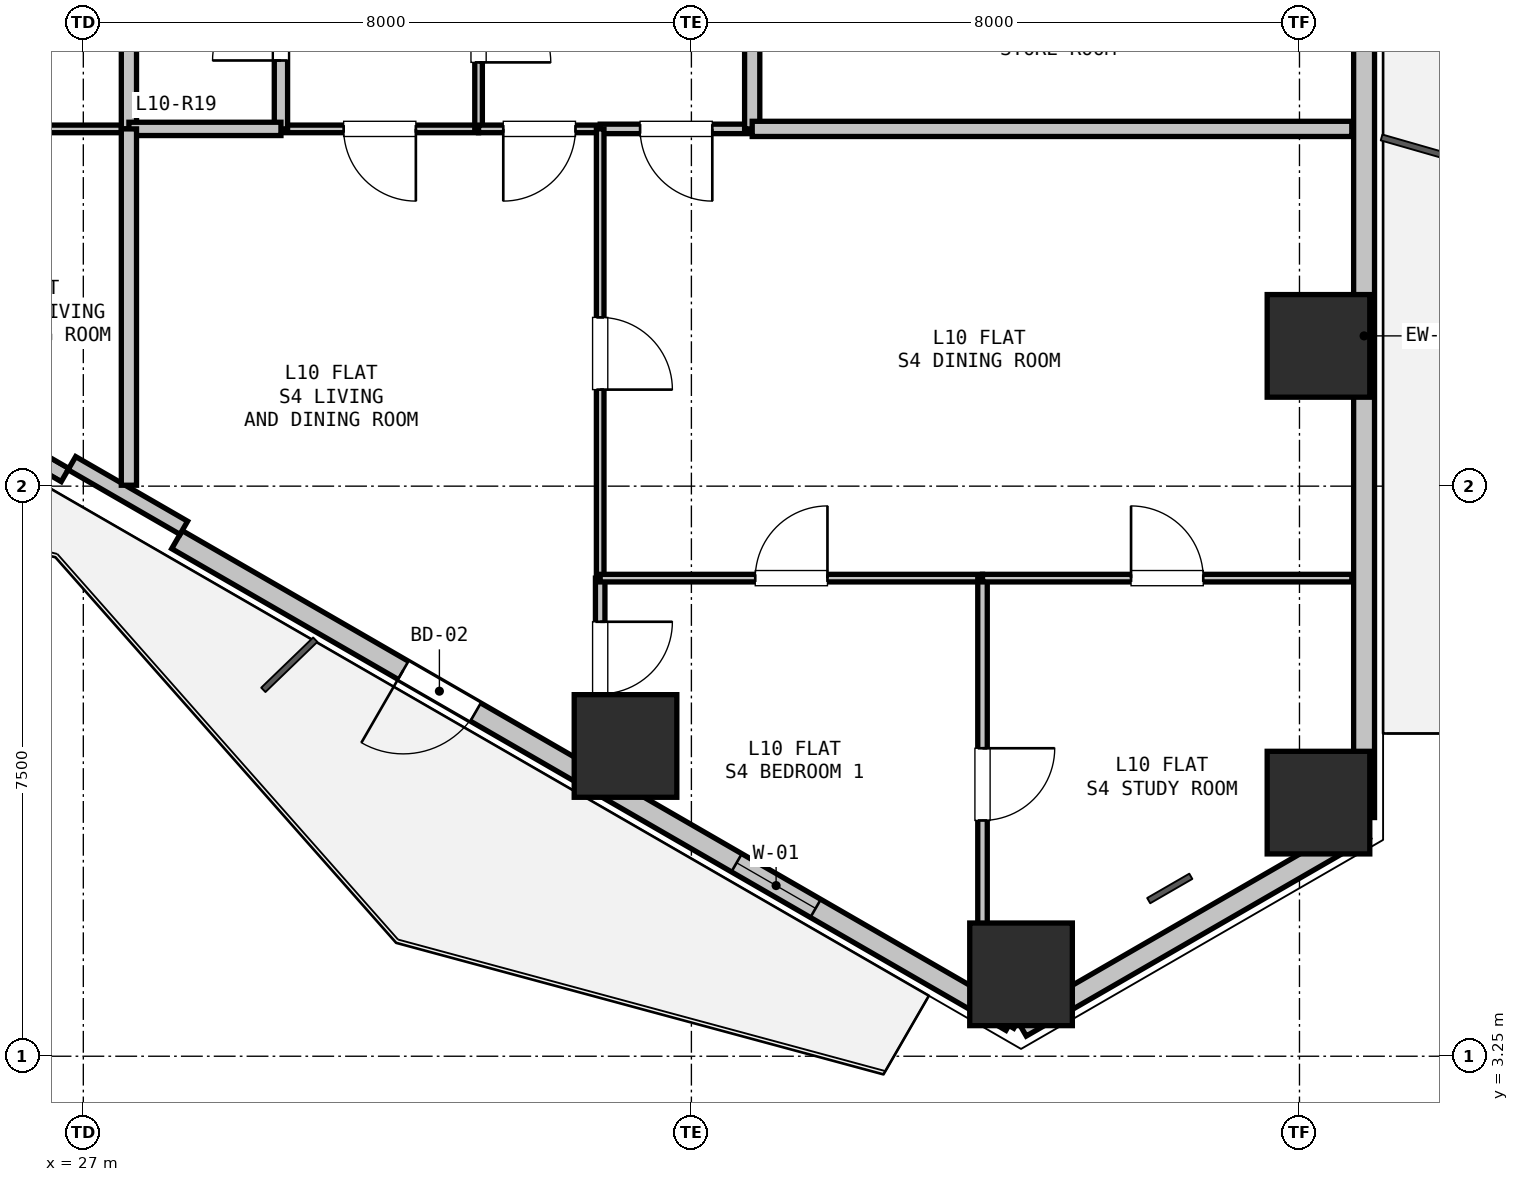
"""IFC4 building model, lengths in metres.
Left out: names, types, materials, properties, quantities, classifications, styles, units other than length and angle.
Written with IfcOpenShell. Run it as: python <this file> out.ifc"""

import sys

from ifc_helpers import new_model, si_unit, direction, frame, frame_2d, origin, origin_2d, place, context, subcontext, project, spatial, rectangle, hollow_rectangle, extrude, element, fill, save


model = new_model("IFC4")
c1 = context("Model", 3, precision=1e-05, world=origin(), true_north=direction((0.0, 1.0)))
c2 = subcontext(c1, "Body", "Model", "MODEL_VIEW")
j1 = project(units=[si_unit("LENGTHUNIT", "METRE"), si_unit("PLANEANGLEUNIT", "RADIAN")], contexts=[c1])
p1 = place(None, origin())
s1 = spatial("IfcSite", under=j1, at=p1, CompositionType="ELEMENT")
p2 = place(p1, origin())
s2 = spatial("IfcBuilding", under=s1, at=p2, CompositionType="ELEMENT")
p3 = place(p2, frame((0.0, 0.0, 39.0)))
s3 = spatial("IfcBuildingStorey", under=s2, at=p3, CompositionType="ELEMENT", Elevation=39.0)
for number, where, z_axis, x_axis in (
    (1, (43.25, 12.595, 0.0), (0.0, 0.0, 1.0), (1.0, 0.0, 0.0)),
    (2, (43.25, 6.587, 0.0), (0.0, 0.0, 1.0), (1.0, 0.0, 0.0)),
    (3, (39.337, 4.327, 0.0), (0.0, 0.0, 1.0), (1.0, 0.0, 0.0)),
    (4, (34.133, 7.332, 0.0), (0.0, 0.0, 1.0), (1.0, 0.0, 0.0)),
):
    element("IfcColumn", number, at=place(p3, frame(where, z_axis=z_axis, x_axis=x_axis)), inside=s3, PredefinedType="COLUMN", context=c2, shape_type="SweptSolid", body=[
        extrude(hollow_rectangle(XDim=1.35, YDim=1.35, WallThickness=0.036, at=origin_2d()), origin(), (0.0, 0.0, 1.0), 3.3),
    ])
p4 = place(p3, frame((43.85, 6.24, 0.0), z_axis=(0.0, 0.0, 1.0), x_axis=(-0.866043601342, -0.499968479581, 0.0)))
e5 = element("IfcWall", 5, at=p4, inside=s3, PredefinedType="SOLIDWALL", context=c2, shape_type="SweptSolid", body=[
    extrude(rectangle(XDim=5.211, YDim=0.275, at=frame_2d((2.605, 0.0))), origin(), (0.0, 0.0, 1.0), 2.66),
])
p5 = place(p3, frame((43.85, 19.063, 0.0), z_axis=(0.0, 0.0, 1.0), x_axis=(0.0, -1.0, 0.0)))
e6 = element("IfcWall", 6, at=p5, inside=s3, PredefinedType="SOLIDWALL", context=c2, shape_type="SweptSolid", body=[
    extrude(rectangle(XDim=12.673, YDim=0.275, at=frame_2d((6.336, 0.0))), origin(), (0.0, 0.0, 1.0), 2.66),
])
p6 = place(p3, frame((39.207, 3.71, 0.0), z_axis=(0.0, 0.0, 1.0), x_axis=(-0.86603192154, 0.499988710747, 0.0)))
e7 = element("IfcWall", 7, at=p6, inside=s3, PredefinedType="SOLIDWALL", context=c2, shape_type="SweptSolid", body=[
    extrude(rectangle(XDim=12.673, YDim=0.275, at=frame_2d((6.336, 0.0))), origin(), (0.0, 0.0, 1.0), 2.66),
])
p7 = place(p6, frame((8.136, 0.0, 0.0)))
e8 = element("IfcOpeningElement", 8, at=p7, cuts=e7, PredefinedType="OPENING", context=c2, shape_type="SweptSolid", body=[
    extrude(rectangle(XDim=1.1, YDim=2.1, at=frame_2d((0.55, 1.05))), frame((0.0, 0.147, 0.0), z_axis=(0.0, -1.0, 0.0), x_axis=(1.0, 0.0, 0.0)), (0.0, 0.0, 1.0), 0.295),
])
p8 = place(p6, frame((2.971, 0.0, 0.9)))
e9 = element("IfcOpeningElement", 9, at=p8, cuts=e7, PredefinedType="OPENING", context=c2, shape_type="SweptSolid", body=[
    extrude(rectangle(XDim=1.2, YDim=1.4, at=frame_2d((0.6, 0.7))), frame((0.0, 0.147, 0.0), z_axis=(0.0, -1.0, 0.0), x_axis=(1.0, 0.0, 0.0)), (0.0, 0.0, 1.0), 0.295),
])
p9 = place(p3, frame((26.76, 10.896, 0.0), z_axis=(0.0, 0.0, 1.0), x_axis=(-0.866027351828, 0.499996625875, 0.0)))
e10 = element("IfcWall", 10, at=p9, inside=s3, PredefinedType="PARAPET", context=c2, shape_type="SweptSolid", body=[
    extrude(rectangle(XDim=11.973, YDim=0.2, at=frame_2d((5.987, 0.0))), origin(), (0.0, 0.0, 1.0), 0.2),
])
p10 = place(p3, frame((28.322, 10.202, 0.0), z_axis=(0.0, 0.0, 1.0), x_axis=(-0.86605165483, 0.499954529098, 0.0)))
e11 = element("IfcWall", 11, at=p10, inside=s3, PredefinedType="PARAPET", context=c2, shape_type="SweptSolid", body=[
    extrude(rectangle(XDim=1.7, YDim=0.2, at=frame_2d((0.85, 0.0))), origin(), (0.0, 0.0, 1.0), 2.66),
])
p11 = place(p3, frame((32.2, 15.45, 0.0), z_axis=(0.0, 0.0, 1.0), x_axis=(-1.0, 0.0, 0.0)))
e12 = element("IfcWall", 12, at=p11, inside=s3, PredefinedType="PARTITIONING", context=c2, shape_type="SweptSolid", body=[
    extrude(rectangle(XDim=2.6, YDim=0.1, at=frame_2d((1.3, 0.0))), origin(), (0.0, 0.0, 1.0), 3.04),
])
p12 = place(p11, frame((0.825, 0.0, 0.0)))
e13 = element("IfcOpeningElement", 13, at=p12, cuts=e12, PredefinedType="OPENING", context=c2, shape_type="SweptSolid", body=[
    extrude(rectangle(XDim=0.95, YDim=2.1, at=frame_2d((0.475, 1.05))), frame((0.0, 0.06, 0.0), z_axis=(0.0, -1.0, 0.0), x_axis=(1.0, 0.0, 0.0)), (0.0, 0.0, 1.0), 0.12),
])
p13 = place(p3, frame((29.6, 15.45, 0.0), z_axis=(0.0, 0.0, 1.0), x_axis=(0.0, 1.0, 0.0)))
e14 = element("IfcWall", 14, at=p13, inside=s3, PredefinedType="PLUMBINGWALL", context=c2, shape_type="SweptSolid", body=[
    extrude(rectangle(XDim=2.7, YDim=0.175, at=frame_2d((1.35, 0.0))), origin(), (0.0, 0.0, 1.0), 3.04),
])
p14 = place(p13, frame((0.9, 0.0, 0.0)))
e15 = element("IfcOpeningElement", 15, at=p14, cuts=e14, PredefinedType="OPENING", context=c2, shape_type="SweptSolid", body=[
    extrude(rectangle(XDim=0.9, YDim=2.1, at=frame_2d((0.45, 1.05))), frame((0.0, 0.097, 0.0), z_axis=(0.0, -1.0, 0.0), x_axis=(1.0, 0.0, 0.0)), (0.0, 0.0, 1.0), 0.195),
])
p15 = place(p3, frame((32.2, 18.15, 0.0), z_axis=(0.0, 0.0, 1.0), x_axis=(0.0, -1.0, 0.0)))
e16 = element("IfcWall", 16, at=p15, inside=s3, PredefinedType="PARTITIONING", context=c2, shape_type="SweptSolid", body=[
    extrude(rectangle(XDim=2.7, YDim=0.1, at=frame_2d((1.35, 0.0))), origin(), (0.0, 0.0, 1.0), 3.04),
])
p16 = place(p15, frame((0.875, 0.0, 0.0)))
e17 = element("IfcOpeningElement", 17, at=p16, cuts=e16, PredefinedType="OPENING", context=c2, shape_type="SweptSolid", body=[
    extrude(rectangle(XDim=0.95, YDim=2.1, at=frame_2d((0.475, 1.05))), frame((0.0, 0.06, 0.0), z_axis=(0.0, -1.0, 0.0), x_axis=(1.0, 0.0, 0.0)), (0.0, 0.0, 1.0), 0.12),
])
p17 = place(p3, frame((27.6, 15.45, 0.0), z_axis=(0.0, 0.0, 1.0), x_axis=(-1.0, 0.0, 0.0)))
e18 = element("IfcWall", 18, at=p17, inside=s3, PredefinedType="PARTITIONING", context=c2, shape_type="SweptSolid", body=[
    extrude(rectangle(XDim=3.2, YDim=0.1, at=frame_2d((1.6, 0.0))), origin(), (0.0, 0.0, 1.0), 2.337),
])
p18 = place(p17, frame((1.125, 0.0, 0.0)))
e19 = element("IfcOpeningElement", 19, at=p18, cuts=e18, PredefinedType="OPENING", context=c2, shape_type="SweptSolid", body=[
    extrude(rectangle(XDim=0.95, YDim=2.1, at=frame_2d((0.475, 1.05))), frame((0.0, 0.06, 0.0), z_axis=(0.0, -1.0, 0.0), x_axis=(1.0, 0.0, 0.0)), (0.0, 0.0, 1.0), 0.12),
])
p19 = place(p3, frame((27.6, 18.15, 0.0), z_axis=(0.0, 0.0, 1.0), x_axis=(0.0, -1.0, 0.0)))
e20 = element("IfcWall", 20, at=p19, inside=s3, PredefinedType="PARTITIONING", context=c2, shape_type="SweptSolid", body=[
    extrude(rectangle(XDim=2.7, YDim=0.2, at=frame_2d((1.35, 0.0))), origin(), (0.0, 0.0, 1.0), 3.04),
])
p20 = place(p3, frame((29.6, 15.45, 0.0), z_axis=(0.0, 0.0, 1.0), x_axis=(-1.0, 0.0, 0.0)))
e21 = element("IfcWall", 21, at=p20, inside=s3, PredefinedType="PLUMBINGWALL", context=c2, shape_type="SweptSolid", body=[
    extrude(rectangle(XDim=2.0, YDim=0.175, at=frame_2d((1.0, 0.0))), origin(), (0.0, 0.0, 1.0), 3.04),
])
p21 = place(p3, frame((35.8, 15.45, 0.0), z_axis=(0.0, 0.0, 1.0), x_axis=(-1.0, 0.0, 0.0)))
e22 = element("IfcWall", 22, at=p21, inside=s3, PredefinedType="PARTITIONING", context=c2, shape_type="SweptSolid", body=[
    extrude(rectangle(XDim=2.0, YDim=0.125, at=frame_2d((1.0, 0.0))), origin(), (0.0, 0.0, 1.0), 3.04),
])
p22 = place(p21, frame((0.525, 0.0, 0.0)))
e23 = element("IfcOpeningElement", 23, at=p22, cuts=e22, PredefinedType="OPENING", context=c2, shape_type="SweptSolid", body=[
    extrude(rectangle(XDim=0.95, YDim=2.1, at=frame_2d((0.475, 1.05))), frame((0.0, 0.073, 0.0), z_axis=(0.0, -1.0, 0.0), x_axis=(1.0, 0.0, 0.0)), (0.0, 0.0, 1.0), 0.145),
])
p23 = place(p3, frame((33.8, 15.45, 0.0), z_axis=(0.0, 0.0, 1.0), x_axis=(-1.0, 0.0, 0.0)))
e24 = element("IfcWall", 24, at=p23, inside=s3, PredefinedType="PARTITIONING", context=c2, shape_type="SweptSolid", body=[
    extrude(rectangle(XDim=1.6, YDim=0.1, at=frame_2d((0.8, 0.0))), origin(), (0.0, 0.0, 1.0), 3.04),
])
p24 = place(p23, frame((0.325, 0.0, 0.0)))
e25 = element("IfcOpeningElement", 25, at=p24, cuts=e24, PredefinedType="OPENING", context=c2, shape_type="SweptSolid", body=[
    extrude(rectangle(XDim=0.95, YDim=2.1, at=frame_2d((0.475, 1.05))), frame((0.0, 0.06, 0.0), z_axis=(0.0, -1.0, 0.0), x_axis=(1.0, 0.0, 0.0)), (0.0, 0.0, 1.0), 0.12),
])
p25 = place(p3, frame((35.8, 18.15, 0.0), z_axis=(0.0, 0.0, 1.0), x_axis=(0.0, -1.0, 0.0)))
e26 = element("IfcWall", 26, at=p25, inside=s3, PredefinedType="PARTITIONING", context=c2, shape_type="SweptSolid", body=[
    extrude(rectangle(XDim=2.7, YDim=0.2, at=frame_2d((1.35, 0.0))), origin(), (0.0, 0.0, 1.0), 3.04),
])
p26 = place(p3, frame((43.688, 15.45, 0.0), z_axis=(0.0, 0.0, 1.0), x_axis=(-1.0, 0.0, 0.0)))
e27 = element("IfcWall", 27, at=p26, inside=s3, PredefinedType="PARTITIONING", context=c2, shape_type="SweptSolid", body=[
    extrude(rectangle(XDim=7.888, YDim=0.2, at=frame_2d((3.944, 0.0))), origin(), (0.0, 0.0, 1.0), 2.337),
])
p27 = place(p3, frame((27.6, 15.45, 0.0), z_axis=(0.0, 0.0, 1.0), x_axis=(0.0, -1.0, 0.0)))
e28 = element("IfcWall", 28, at=p27, inside=s3, PredefinedType="PARTITIONING", context=c2, shape_type="SweptSolid", body=[
    extrude(rectangle(XDim=4.688, YDim=0.2, at=frame_2d((2.344, 0.0))), origin(), (0.0, 0.0, 1.0), 2.337),
])
p28 = place(p3, frame((33.8, 15.45, 0.0), z_axis=(0.0, 0.0, 1.0), x_axis=(0.0, -1.0, 0.0)))
e29 = element("IfcWall", 29, at=p28, inside=s3, PredefinedType="PARTITIONING", context=c2, shape_type="SweptSolid", body=[
    extrude(rectangle(XDim=5.91, YDim=0.1, at=frame_2d((2.955, 0.0))), origin(), (0.0, 0.0, 1.0), 3.04),
])
p29 = place(p28, frame((2.48, 0.0, 0.0)))
e30 = element("IfcOpeningElement", 30, at=p29, cuts=e29, PredefinedType="OPENING", context=c2, shape_type="SweptSolid", body=[
    extrude(rectangle(XDim=0.95, YDim=2.1, at=frame_2d((0.475, 1.05))), frame((0.0, 0.06, 0.0), z_axis=(0.0, -1.0, 0.0), x_axis=(1.0, 0.0, 0.0)), (0.0, 0.0, 1.0), 0.12),
])
p30 = place(p3, frame((33.8, 9.54, 0.0), z_axis=(0.0, 0.0, 1.0), x_axis=(0.0, -1.0, 0.0)))
e31 = element("IfcWall", 31, at=p30, inside=s3, PredefinedType="PARTITIONING", context=c2, shape_type="SweptSolid", body=[
    extrude(rectangle(XDim=2.522, YDim=0.125, at=frame_2d((1.261, 0.0))), origin(), (0.0, 0.0, 1.0), 2.337),
])
p31 = place(p30, frame((0.574, 0.0, 0.0)))
e32 = element("IfcOpeningElement", 32, at=p31, cuts=e31, PredefinedType="OPENING", context=c2, shape_type="SweptSolid", body=[
    extrude(rectangle(XDim=0.95, YDim=2.1, at=frame_2d((0.475, 1.05))), frame((0.0, 0.073, 0.0), z_axis=(0.0, -1.0, 0.0), x_axis=(1.0, 0.0, 0.0)), (0.0, 0.0, 1.0), 0.145),
])
p32 = place(p3, frame((33.8, 9.54, 0.0), z_axis=(0.0, 0.0, 1.0), x_axis=(1.0, 0.0, 0.0)))
e33 = element("IfcWall", 33, at=p32, inside=s3, PredefinedType="PARTITIONING", context=c2, shape_type="SweptSolid", body=[
    extrude(rectangle(XDim=5.03, YDim=0.1, at=frame_2d((2.515, 0.0))), origin(), (0.0, 0.0, 1.0), 3.04),
])
p33 = place(p32, frame((2.04, 0.0, 0.0)))
e34 = element("IfcOpeningElement", 34, at=p33, cuts=e33, PredefinedType="OPENING", context=c2, shape_type="SweptSolid", body=[
    extrude(rectangle(XDim=0.95, YDim=2.1, at=frame_2d((0.475, 1.05))), frame((0.0, 0.06, 0.0), z_axis=(0.0, -1.0, 0.0), x_axis=(1.0, 0.0, 0.0)), (0.0, 0.0, 1.0), 0.12),
])
p34 = place(p3, frame((38.83, 9.54, 0.0), z_axis=(0.0, 0.0, 1.0), x_axis=(0.0, -1.0, 0.0)))
e35 = element("IfcWall", 35, at=p34, inside=s3, PredefinedType="PARTITIONING", context=c2, shape_type="SweptSolid", body=[
    extrude(rectangle(XDim=5.426, YDim=0.125, at=frame_2d((2.713, 0.0))), origin(), (0.0, 0.0, 1.0), 2.65),
])
p35 = place(p34, frame((2.238, 0.0, 0.0)))
e36 = element("IfcOpeningElement", 36, at=p35, cuts=e35, PredefinedType="OPENING", context=c2, shape_type="SweptSolid", body=[
    extrude(rectangle(XDim=0.95, YDim=2.1, at=frame_2d((0.475, 1.05))), frame((0.0, 0.073, 0.0), z_axis=(0.0, -1.0, 0.0), x_axis=(1.0, 0.0, 0.0)), (0.0, 0.0, 1.0), 0.145),
])
p36 = place(p3, frame((38.83, 9.54, 0.0), z_axis=(0.0, 0.0, 1.0), x_axis=(1.0, 0.0, 0.0)))
e37 = element("IfcWall", 37, at=p36, inside=s3, PredefinedType="PARTITIONING", context=c2, shape_type="SweptSolid", body=[
    extrude(rectangle(XDim=4.858, YDim=0.1, at=frame_2d((2.429, 0.0))), origin(), (0.0, 0.0, 1.0), 2.337),
])
p37 = place(p36, frame((1.954, 0.0, 0.0)))
e38 = element("IfcOpeningElement", 38, at=p37, cuts=e37, PredefinedType="OPENING", context=c2, shape_type="SweptSolid", body=[
    extrude(rectangle(XDim=0.95, YDim=2.1, at=frame_2d((0.475, 1.05))), frame((0.0, 0.06, 0.0), z_axis=(0.0, -1.0, 0.0), x_axis=(1.0, 0.0, 0.0)), (0.0, 0.0, 1.0), 0.12),
])
p38 = place(p3, frame((39.272, 3.672, 0.0), z_axis=(0.0, 0.0, 1.0), x_axis=(-0.866442544969, 0.49927679324, 0.0)))
e39 = element("IfcWall", 39, at=p38, inside=s3, PredefinedType="PARTITIONING", context=c2, shape_type="SweptSolid", body=[
    extrude(rectangle(XDim=0.142, YDim=0.125, at=frame_2d((0.071, 0.0))), origin(), (0.0, 0.0, 1.0), 3.04),
])
p39 = place(p7, origin())
e40 = element("IfcDoor", 40, at=p39, inside=s3, OperationType="SINGLE_SWING_RIGHT", PredefinedType="DOOR", context=c2, shape_type="SweptSolid", body=[
    extrude(rectangle(XDim=1.1, YDim=2.1, at=frame_2d((0.55, 1.05))), frame((0.0, 0.025, 0.0), z_axis=(0.0, -1.0, 0.0), x_axis=(1.0, 0.0, 0.0)), (0.0, 0.0, 1.0), 0.05),
])
fill(e8, e40)
p40 = place(p8, origin())
e41 = element("IfcWindow", 41, at=p40, inside=s3, PartitioningType="SINGLE_PANEL", PredefinedType="WINDOW", context=c2, shape_type="SweptSolid", body=[
    extrude(rectangle(XDim=1.2, YDim=1.4, at=frame_2d((0.6, 0.7))), frame((0.0, 0.03, 0.0), z_axis=(0.0, -1.0, 0.0), x_axis=(1.0, 0.0, 0.0)), (0.0, 0.0, 1.0), 0.06),
])
fill(e9, e41)
p41 = place(p14, origin())
e42 = element("IfcDoor", 42, at=p41, inside=s3, OperationType="SINGLE_SWING_LEFT", PredefinedType="DOOR", context=c2, shape_type="SweptSolid", body=[
    extrude(rectangle(XDim=0.9, YDim=2.1, at=frame_2d((0.45, 1.05))), frame((0.0, 0.025, 0.0), z_axis=(0.0, -1.0, 0.0), x_axis=(1.0, 0.0, 0.0)), (0.0, 0.0, 1.0), 0.05),
])
fill(e15, e42)
p42 = place(p16, origin())
e43 = element("IfcDoor", 43, at=p42, inside=s3, OperationType="SINGLE_SWING_RIGHT", PredefinedType="DOOR", context=c2, shape_type="SweptSolid", body=[
    extrude(rectangle(XDim=0.95, YDim=2.1, at=frame_2d((0.475, 1.05))), frame((0.0, 0.025, 0.0), z_axis=(0.0, -1.0, 0.0), x_axis=(1.0, 0.0, 0.0)), (0.0, 0.0, 1.0), 0.05),
])
fill(e17, e43)
p43 = place(p12, origin())
e44 = element("IfcDoor", 44, at=p43, inside=s3, OperationType="SINGLE_SWING_LEFT", PredefinedType="DOOR", context=c2, shape_type="SweptSolid", body=[
    extrude(rectangle(XDim=0.95, YDim=2.1, at=frame_2d((0.475, 1.05))), frame((0.0, 0.025, 0.0), z_axis=(0.0, -1.0, 0.0), x_axis=(1.0, 0.0, 0.0)), (0.0, 0.0, 1.0), 0.05),
])
fill(e13, e44)
p44 = place(p24, origin())
e45 = element("IfcDoor", 45, at=p44, inside=s3, OperationType="SINGLE_SWING_RIGHT", PredefinedType="DOOR", context=c2, shape_type="SweptSolid", body=[
    extrude(rectangle(XDim=0.95, YDim=2.1, at=frame_2d((0.475, 1.05))), frame((0.0, 0.025, 0.0), z_axis=(0.0, -1.0, 0.0), x_axis=(1.0, 0.0, 0.0)), (0.0, 0.0, 1.0), 0.05),
])
fill(e25, e45)
p45 = place(p22, origin())
e46 = element("IfcDoor", 46, at=p45, inside=s3, OperationType="SINGLE_SWING_LEFT", PredefinedType="DOOR", context=c2, shape_type="SweptSolid", body=[
    extrude(rectangle(XDim=0.95, YDim=2.1, at=frame_2d((0.475, 1.05))), frame((0.0, 0.025, 0.0), z_axis=(0.0, -1.0, 0.0), x_axis=(1.0, 0.0, 0.0)), (0.0, 0.0, 1.0), 0.05),
])
fill(e23, e46)
p46 = place(p31, origin())
e47 = element("IfcDoor", 47, at=p46, inside=s3, OperationType="SINGLE_SWING_LEFT", PredefinedType="DOOR", context=c2, shape_type="SweptSolid", body=[
    extrude(rectangle(XDim=0.95, YDim=2.1, at=frame_2d((0.475, 1.05))), frame((0.0, 0.025, 0.0), z_axis=(0.0, -1.0, 0.0), x_axis=(1.0, 0.0, 0.0)), (0.0, 0.0, 1.0), 0.05),
])
fill(e32, e47)
p47 = place(p29, origin())
e48 = element("IfcDoor", 48, at=p47, inside=s3, OperationType="SINGLE_SWING_RIGHT", PredefinedType="DOOR", context=c2, shape_type="SweptSolid", body=[
    extrude(rectangle(XDim=0.95, YDim=2.1, at=frame_2d((0.475, 1.05))), frame((0.0, 0.025, 0.0), z_axis=(0.0, -1.0, 0.0), x_axis=(1.0, 0.0, 0.0)), (0.0, 0.0, 1.0), 0.05),
])
fill(e30, e48)
p48 = place(p35, origin())
e49 = element("IfcDoor", 49, at=p48, inside=s3, OperationType="SINGLE_SWING_LEFT", PredefinedType="DOOR", context=c2, shape_type="SweptSolid", body=[
    extrude(rectangle(XDim=0.95, YDim=2.1, at=frame_2d((0.475, 1.05))), frame((0.0, 0.025, 0.0), z_axis=(0.0, -1.0, 0.0), x_axis=(1.0, 0.0, 0.0)), (0.0, 0.0, 1.0), 0.05),
])
fill(e36, e49)
p49 = place(p33, origin())
e50 = element("IfcDoor", 50, at=p49, inside=s3, OperationType="SINGLE_SWING_RIGHT", PredefinedType="DOOR", context=c2, shape_type="SweptSolid", body=[
    extrude(rectangle(XDim=0.95, YDim=2.1, at=frame_2d((0.475, 1.05))), frame((0.0, 0.025, 0.0), z_axis=(0.0, -1.0, 0.0), x_axis=(1.0, 0.0, 0.0)), (0.0, 0.0, 1.0), 0.05),
])
fill(e34, e50)
p50 = place(p37, origin())
e51 = element("IfcDoor", 51, at=p50, inside=s3, OperationType="SINGLE_SWING_LEFT", PredefinedType="DOOR", context=c2, shape_type="SweptSolid", body=[
    extrude(rectangle(XDim=0.95, YDim=2.1, at=frame_2d((0.475, 1.05))), frame((0.0, 0.025, 0.0), z_axis=(0.0, -1.0, 0.0), x_axis=(1.0, 0.0, 0.0)), (0.0, 0.0, 1.0), 0.05),
])
fill(e38, e51)
save(model, sys.argv[1])
